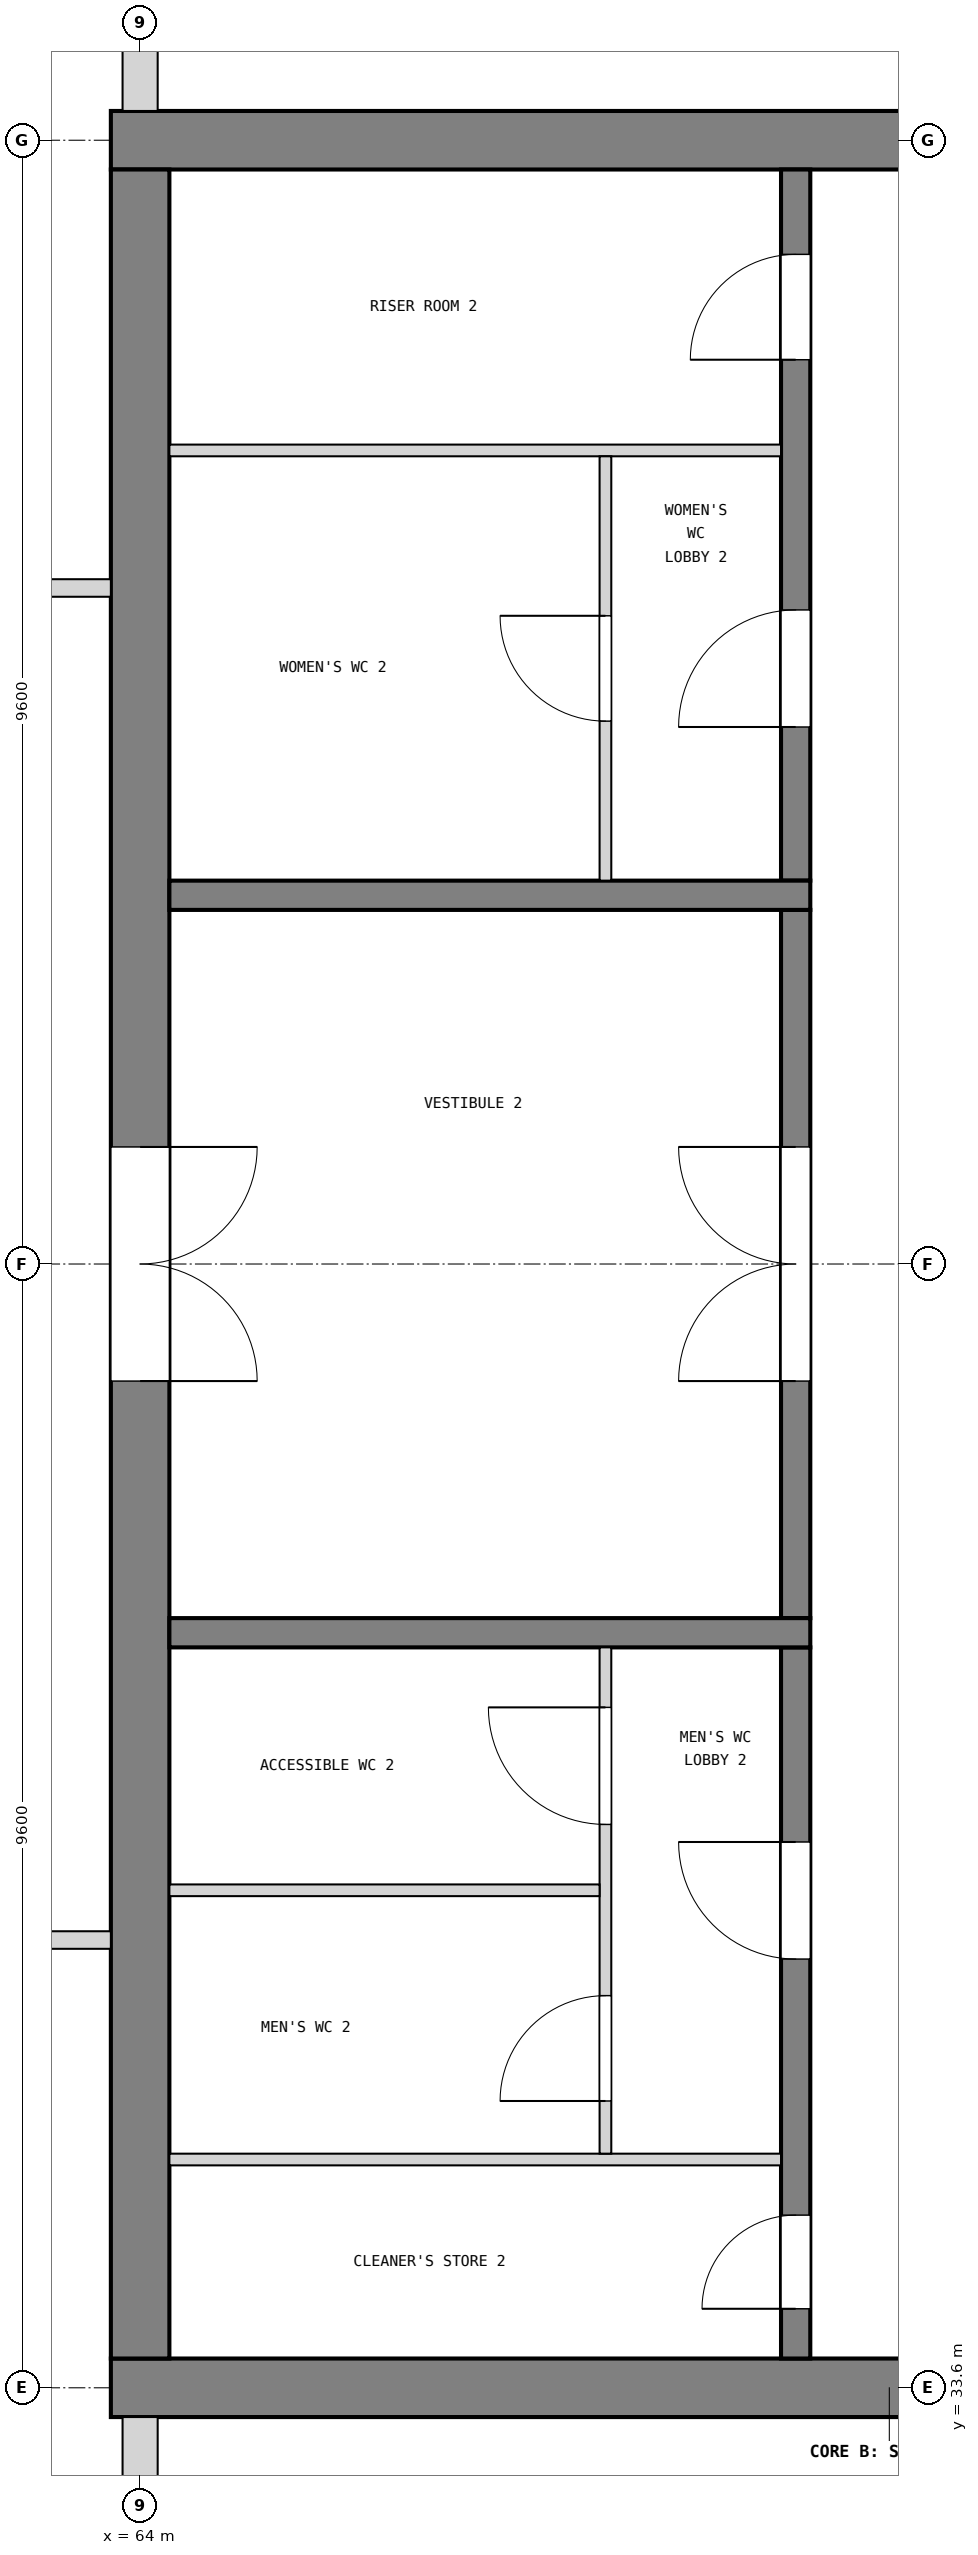
"""IFC4 building model, lengths in metres.
Left out: names, types, materials, properties, quantities, classifications, styles, units other than length and angle.
Written with IfcOpenShell. Run it as: python <this file> out.ifc"""

import sys

from ifc_helpers import new_model, si_unit, direction, frame, frame_2d, origin, place, context, subcontext, project, spatial, rectangle, extrude, element, fill, save


model = new_model("IFC4")
c1 = context("Model", 3, precision=1e-05, world=origin(), true_north=direction((0.0, 1.0)))
c2 = subcontext(c1, "Body", "Model", "MODEL_VIEW")
j1 = project(units=[si_unit("LENGTHUNIT", "METRE"), si_unit("PLANEANGLEUNIT", "RADIAN")], contexts=[c1])
p1 = place(None, origin())
s1 = spatial("IfcSite", under=j1, at=p1, CompositionType="ELEMENT")
p2 = place(p1, origin())
s2 = spatial("IfcBuilding", under=s1, at=p2, CompositionType="ELEMENT")
p3 = place(p2, frame((0.0, 0.0, 21.0)))
s3 = spatial("IfcBuildingStorey", under=s2, at=p3, CompositionType="ELEMENT", Elevation=21.0)
p4 = place(p3, frame((63.75, 52.8, 0.0), z_axis=(0.0, 0.0, 1.0), x_axis=(1.0, 0.0, 0.0)))
e1 = element("IfcWall", 1, at=p4, inside=s3, PredefinedType="SHEAR", context=c2, shape_type="SweptSolid", body=[
    extrude(rectangle(XDim=13.3, YDim=0.5, at=frame_2d((6.65, 0.0))), origin(), (0.0, 0.0, 1.0), 3.9),
])
p5 = place(p4, frame((11.05, 0.0, 1.0)))
e2 = element("IfcOpeningElement", 2, at=p5, cuts=e1, PredefinedType="OPENING", context=c2, shape_type="SweptSolid", body=[
    extrude(rectangle(XDim=0.4, YDim=2.0, at=frame_2d((0.2, 1.0))), frame((0.0, 0.26, 0.0), z_axis=(0.0, -1.0, 0.0), x_axis=(1.0, 0.0, 0.0)), (0.0, 0.0, 1.0), 0.52),
])
p6 = place(p3, frame((63.75, 33.6, 0.0), z_axis=(0.0, 0.0, 1.0), x_axis=(1.0, 0.0, 0.0)))
e3 = element("IfcWall", 3, at=p6, inside=s3, PredefinedType="SHEAR", context=c2, shape_type="SweptSolid", body=[
    extrude(rectangle(XDim=13.3, YDim=0.5, at=frame_2d((6.65, 0.0))), origin(), (0.0, 0.0, 1.0), 3.9),
])
p7 = place(p6, frame((11.05, 0.0, 1.0)))
e4 = element("IfcOpeningElement", 4, at=p7, cuts=e3, PredefinedType="OPENING", context=c2, shape_type="SweptSolid", body=[
    extrude(rectangle(XDim=0.4, YDim=2.0, at=frame_2d((0.2, 1.0))), frame((0.0, 0.26, 0.0), z_axis=(0.0, -1.0, 0.0), x_axis=(1.0, 0.0, 0.0)), (0.0, 0.0, 1.0), 0.52),
])
p8 = place(p3, frame((64.0, 33.85, 0.0), z_axis=(0.0, 0.0, 1.0), x_axis=(0.0, 1.0, 0.0)))
e5 = element("IfcWall", 5, at=p8, inside=s3, PredefinedType="SHEAR", context=c2, shape_type="SweptSolid", body=[
    extrude(rectangle(XDim=18.7, YDim=0.5, at=frame_2d((9.35, 0.0))), origin(), (0.0, 0.0, 1.0), 3.9),
])
p9 = place(p8, frame((8.35, 0.0, 0.0)))
e6 = element("IfcOpeningElement", 6, at=p9, cuts=e5, PredefinedType="OPENING", context=c2, shape_type="SweptSolid", body=[
    extrude(rectangle(XDim=2.0, YDim=2.1, at=frame_2d((1.0, 1.05))), frame((0.0, 0.26, 0.0), z_axis=(0.0, -1.0, 0.0), x_axis=(1.0, 0.0, 0.0)), (0.0, 0.0, 1.0), 0.52),
])
p10 = place(p3, frame((64.0, 31.0, 0.0), z_axis=(0.0, 0.0, 1.0), x_axis=(0.0, 1.0, 0.0)))
e7 = element("IfcWall", 7, at=p10, inside=s3, PredefinedType="SOLIDWALL", context=c2, shape_type="SweptSolid", body=[
    extrude(rectangle(XDim=2.35, YDim=0.3, at=frame_2d((1.175, 0.0))), origin(), (0.0, 0.0, 1.0), 2.88),
])
p11 = place(p3, frame((64.0, 53.05, 0.0), z_axis=(0.0, 0.0, 1.0), x_axis=(0.0, 1.0, 0.0)))
e8 = element("IfcWall", 8, at=p11, inside=s3, PredefinedType="SOLIDWALL", context=c2, shape_type="SweptSolid", body=[
    extrude(rectangle(XDim=2.35, YDim=0.3, at=frame_2d((1.175, 0.0))), origin(), (0.0, 0.0, 1.0), 2.88),
])
p12 = place(p3, frame((69.6, 33.85, 0.0), z_axis=(0.0, 0.0, 1.0), x_axis=(0.0, 1.0, 0.0)))
e9 = element("IfcWall", 9, at=p12, inside=s3, PredefinedType="SOLIDWALL", context=c2, shape_type="SweptSolid", body=[
    extrude(rectangle(XDim=6.075, YDim=0.25, at=frame_2d((3.038, 0.0))), origin(), (0.0, 0.0, 1.0), 3.6),
])
p13 = place(p12, frame((0.425, 0.0, 0.0)))
e10 = element("IfcOpeningElement", 10, at=p13, cuts=e9, PredefinedType="OPENING", context=c2, shape_type="SweptSolid", body=[
    extrude(rectangle(XDim=0.8, YDim=2.1, at=frame_2d((0.4, 1.05))), frame((0.0, 0.135, 0.0), z_axis=(0.0, -1.0, 0.0), x_axis=(1.0, 0.0, 0.0)), (0.0, 0.0, 1.0), 0.27),
])
p14 = place(p12, frame((3.413, 0.0, 0.0)))
e11 = element("IfcOpeningElement", 11, at=p14, cuts=e9, PredefinedType="OPENING", context=c2, shape_type="SweptSolid", body=[
    extrude(rectangle(XDim=1.0, YDim=2.1, at=frame_2d((0.5, 1.05))), frame((0.0, 0.135, 0.0), z_axis=(0.0, -1.0, 0.0), x_axis=(1.0, 0.0, 0.0)), (0.0, 0.0, 1.0), 0.27),
])
p15 = place(p3, frame((69.6, 40.175, 0.0), z_axis=(0.0, 0.0, 1.0), x_axis=(0.0, 1.0, 0.0)))
e12 = element("IfcWall", 12, at=p15, inside=s3, PredefinedType="SOLIDWALL", context=c2, shape_type="SweptSolid", body=[
    extrude(rectangle(XDim=6.05, YDim=0.25, at=frame_2d((3.025, 0.0))), origin(), (0.0, 0.0, 1.0), 3.6),
])
p16 = place(p15, frame((2.025, 0.0, 0.0)))
e13 = element("IfcOpeningElement", 13, at=p16, cuts=e12, PredefinedType="OPENING", context=c2, shape_type="SweptSolid", body=[
    extrude(rectangle(XDim=2.0, YDim=2.1, at=frame_2d((1.0, 1.05))), frame((0.0, 0.135, 0.0), z_axis=(0.0, -1.0, 0.0), x_axis=(1.0, 0.0, 0.0)), (0.0, 0.0, 1.0), 0.27),
])
p17 = place(p3, frame((69.6, 46.475, 0.0), z_axis=(0.0, 0.0, 1.0), x_axis=(0.0, 1.0, 0.0)))
e14 = element("IfcWall", 14, at=p17, inside=s3, PredefinedType="SOLIDWALL", context=c2, shape_type="SweptSolid", body=[
    extrude(rectangle(XDim=6.075, YDim=0.25, at=frame_2d((3.038, 0.0))), origin(), (0.0, 0.0, 1.0), 3.6),
])
p18 = place(p17, frame((1.312, 0.0, 0.0)))
e15 = element("IfcOpeningElement", 15, at=p18, cuts=e14, PredefinedType="OPENING", context=c2, shape_type="SweptSolid", body=[
    extrude(rectangle(XDim=1.0, YDim=2.1, at=frame_2d((0.5, 1.05))), frame((0.0, 0.135, 0.0), z_axis=(0.0, -1.0, 0.0), x_axis=(1.0, 0.0, 0.0)), (0.0, 0.0, 1.0), 0.27),
])
p19 = place(p17, frame((4.45, 0.0, 0.0)))
e16 = element("IfcOpeningElement", 16, at=p19, cuts=e14, PredefinedType="OPENING", context=c2, shape_type="SweptSolid", body=[
    extrude(rectangle(XDim=0.9, YDim=2.1, at=frame_2d((0.45, 1.05))), frame((0.0, 0.135, 0.0), z_axis=(0.0, -1.0, 0.0), x_axis=(1.0, 0.0, 0.0)), (0.0, 0.0, 1.0), 0.27),
])
for number, where, z_axis, x_axis in (
    (17, (69.725, 40.05, 0.0), (0.0, 0.0, 1.0), (-1.0, 0.0, 0.0)),
    (18, (69.725, 46.35, 0.0), (0.0, 0.0, 1.0), (-1.0, 0.0, 0.0)),
):
    element("IfcWall", number, at=place(p3, frame(where, z_axis=z_axis, x_axis=x_axis)), inside=s3, PredefinedType="SOLIDWALL", context=c2, shape_type="SweptSolid", body=[
        extrude(rectangle(XDim=5.475, YDim=0.25, at=frame_2d((2.738, 0.0))), origin(), (0.0, 0.0, 1.0), 3.6),
    ])
p20 = place(p3, frame((69.475, 35.55, 0.0), z_axis=(0.0, 0.0, 1.0), x_axis=(-1.0, 0.0, 0.0)))
e19 = element("IfcWall", 19, at=p20, inside=s3, PredefinedType="PARTITIONING", context=c2, shape_type="SweptSolid", body=[
    extrude(rectangle(XDim=5.225, YDim=0.1, at=frame_2d((2.613, 0.0))), origin(), (0.0, 0.0, 1.0), 3.6),
])
p21 = place(p3, frame((67.975, 35.6, 0.0), z_axis=(0.0, 0.0, 1.0), x_axis=(0.0, 1.0, 0.0)))
e20 = element("IfcWall", 20, at=p21, inside=s3, PredefinedType="PARTITIONING", context=c2, shape_type="SweptSolid", body=[
    extrude(rectangle(XDim=4.325, YDim=0.1, at=frame_2d((2.163, 0.0))), origin(), (0.0, 0.0, 1.0), 3.6),
])
p22 = place(p21, frame((0.45, 0.0, 0.0)))
e21 = element("IfcOpeningElement", 21, at=p22, cuts=e20, PredefinedType="OPENING", context=c2, shape_type="SweptSolid", body=[
    extrude(rectangle(XDim=0.9, YDim=2.1, at=frame_2d((0.45, 1.05))), frame((0.0, 0.06, 0.0), z_axis=(0.0, -1.0, 0.0), x_axis=(1.0, 0.0, 0.0)), (0.0, 0.0, 1.0), 0.12),
])
p23 = place(p21, frame((2.812, 0.0, 0.0)))
e22 = element("IfcOpeningElement", 22, at=p23, cuts=e20, PredefinedType="OPENING", context=c2, shape_type="SweptSolid", body=[
    extrude(rectangle(XDim=1.0, YDim=2.1, at=frame_2d((0.5, 1.05))), frame((0.0, 0.06, 0.0), z_axis=(0.0, -1.0, 0.0), x_axis=(1.0, 0.0, 0.0)), (0.0, 0.0, 1.0), 0.12),
])
p24 = place(p3, frame((67.925, 37.85, 0.0), z_axis=(0.0, 0.0, 1.0), x_axis=(-1.0, 0.0, 0.0)))
e23 = element("IfcWall", 23, at=p24, inside=s3, PredefinedType="PARTITIONING", context=c2, shape_type="SweptSolid", body=[
    extrude(rectangle(XDim=3.675, YDim=0.1, at=frame_2d((1.837, 0.0))), origin(), (0.0, 0.0, 1.0), 3.6),
])
p25 = place(p3, frame((69.475, 50.15, 0.0), z_axis=(0.0, 0.0, 1.0), x_axis=(-1.0, 0.0, 0.0)))
e24 = element("IfcWall", 24, at=p25, inside=s3, PredefinedType="PARTITIONING", context=c2, shape_type="SweptSolid", body=[
    extrude(rectangle(XDim=5.225, YDim=0.1, at=frame_2d((2.613, 0.0))), origin(), (0.0, 0.0, 1.0), 3.6),
])
p26 = place(p3, frame((67.975, 46.475, 0.0), z_axis=(0.0, 0.0, 1.0), x_axis=(0.0, 1.0, 0.0)))
e25 = element("IfcWall", 25, at=p26, inside=s3, PredefinedType="PARTITIONING", context=c2, shape_type="SweptSolid", body=[
    extrude(rectangle(XDim=3.625, YDim=0.1, at=frame_2d((1.812, 0.0))), origin(), (0.0, 0.0, 1.0), 3.6),
])
p27 = place(p26, frame((1.363, 0.0, 0.0)))
e26 = element("IfcOpeningElement", 26, at=p27, cuts=e25, PredefinedType="OPENING", context=c2, shape_type="SweptSolid", body=[
    extrude(rectangle(XDim=0.9, YDim=2.1, at=frame_2d((0.45, 1.05))), frame((0.0, 0.06, 0.0), z_axis=(0.0, -1.0, 0.0), x_axis=(1.0, 0.0, 0.0)), (0.0, 0.0, 1.0), 0.12),
])
p28 = place(p3, frame((54.4, 37.425, 0.0), z_axis=(0.0, 0.0, 1.0), x_axis=(1.0, 0.0, 0.0)))
e27 = element("IfcWall", 27, at=p28, inside=s3, PredefinedType="PARTITIONING", context=c2, shape_type="SweptSolid", body=[
    extrude(rectangle(XDim=9.35, YDim=0.15, at=frame_2d((4.675, 0.0))), origin(), (0.0, 0.0, 1.0), 3.68),
])
p29 = place(p28, frame((3.85, 0.0, 0.0)))
e28 = element("IfcOpeningElement", 28, at=p29, cuts=e27, PredefinedType="OPENING", context=c2, shape_type="SweptSolid", body=[
    extrude(rectangle(XDim=1.8, YDim=2.1, at=frame_2d((0.9, 1.05))), frame((0.0, 0.085, 0.0), z_axis=(0.0, -1.0, 0.0), x_axis=(1.0, 0.0, 0.0)), (0.0, 0.0, 1.0), 0.17),
])
p30 = place(p3, frame((57.78, 48.975, 0.0), z_axis=(0.0, 0.0, 1.0), x_axis=(1.0, 0.0, 0.0)))
e29 = element("IfcWall", 29, at=p30, inside=s3, PredefinedType="PARTITIONING", context=c2, shape_type="SweptSolid", body=[
    extrude(rectangle(XDim=5.97, YDim=0.15, at=frame_2d((2.985, 0.0))), origin(), (0.0, 0.0, 1.0), 3.68),
])
p31 = place(p30, frame((2.52, 0.0, 0.0)))
e30 = element("IfcOpeningElement", 30, at=p31, cuts=e29, PredefinedType="OPENING", context=c2, shape_type="SweptSolid", body=[
    extrude(rectangle(XDim=1.0, YDim=2.1, at=frame_2d((0.5, 1.05))), frame((0.0, 0.085, 0.0), z_axis=(0.0, -1.0, 0.0), x_axis=(1.0, 0.0, 0.0)), (0.0, 0.0, 1.0), 0.17),
])
p32 = place(p16, origin())
e31 = element("IfcDoor", 31, at=p32, inside=s3, OperationType="DOUBLE_DOOR_SINGLE_SWING", PredefinedType="DOOR", context=c2, shape_type="SweptSolid", body=[
    extrude(rectangle(XDim=2.0, YDim=2.1, at=frame_2d((1.0, 1.05))), frame((0.0, 0.025, 0.0), z_axis=(0.0, -1.0, 0.0), x_axis=(1.0, 0.0, 0.0)), (0.0, 0.0, 1.0), 0.05),
])
fill(e13, e31)
p33 = place(p9, frame((2.0, 0.0, 0.0), z_axis=(0.0, 0.0, 1.0), x_axis=(-1.0, 0.0, 0.0)))
e32 = element("IfcDoor", 32, at=p33, inside=s3, OperationType="DOUBLE_DOOR_SINGLE_SWING", PredefinedType="DOOR", context=c2, shape_type="SweptSolid", body=[
    extrude(rectangle(XDim=2.0, YDim=2.1, at=frame_2d((1.0, 1.05))), frame((0.0, 0.025, 0.0), z_axis=(0.0, -1.0, 0.0), x_axis=(1.0, 0.0, 0.0)), (0.0, 0.0, 1.0), 0.05),
])
fill(e6, e32)
p34 = place(p13, origin())
e33 = element("IfcDoor", 33, at=p34, inside=s3, OperationType="SINGLE_SWING_LEFT", PredefinedType="DOOR", context=c2, shape_type="SweptSolid", body=[
    extrude(rectangle(XDim=0.8, YDim=2.1, at=frame_2d((0.4, 1.05))), frame((0.0, 0.025, 0.0), z_axis=(0.0, -1.0, 0.0), x_axis=(1.0, 0.0, 0.0)), (0.0, 0.0, 1.0), 0.05),
])
fill(e10, e33)
p35 = place(p14, origin())
e34 = element("IfcDoor", 34, at=p35, inside=s3, OperationType="SINGLE_SWING_RIGHT", PredefinedType="DOOR", context=c2, shape_type="SweptSolid", body=[
    extrude(rectangle(XDim=1.0, YDim=2.1, at=frame_2d((0.5, 1.05))), frame((0.0, 0.025, 0.0), z_axis=(0.0, -1.0, 0.0), x_axis=(1.0, 0.0, 0.0)), (0.0, 0.0, 1.0), 0.05),
])
fill(e11, e34)
p36 = place(p22, origin())
e35 = element("IfcDoor", 35, at=p36, inside=s3, OperationType="SINGLE_SWING_LEFT", PredefinedType="DOOR", context=c2, shape_type="SweptSolid", body=[
    extrude(rectangle(XDim=0.9, YDim=2.1, at=frame_2d((0.45, 1.05))), frame((0.0, 0.025, 0.0), z_axis=(0.0, -1.0, 0.0), x_axis=(1.0, 0.0, 0.0)), (0.0, 0.0, 1.0), 0.05),
])
fill(e21, e35)
p37 = place(p23, origin())
e36 = element("IfcDoor", 36, at=p37, inside=s3, OperationType="SINGLE_SWING_RIGHT", PredefinedType="DOOR", context=c2, shape_type="SweptSolid", body=[
    extrude(rectangle(XDim=1.0, YDim=2.1, at=frame_2d((0.5, 1.05))), frame((0.0, 0.025, 0.0), z_axis=(0.0, -1.0, 0.0), x_axis=(1.0, 0.0, 0.0)), (0.0, 0.0, 1.0), 0.05),
])
fill(e22, e36)
p38 = place(p18, origin())
e37 = element("IfcDoor", 37, at=p38, inside=s3, OperationType="SINGLE_SWING_LEFT", PredefinedType="DOOR", context=c2, shape_type="SweptSolid", body=[
    extrude(rectangle(XDim=1.0, YDim=2.1, at=frame_2d((0.5, 1.05))), frame((0.0, 0.025, 0.0), z_axis=(0.0, -1.0, 0.0), x_axis=(1.0, 0.0, 0.0)), (0.0, 0.0, 1.0), 0.05),
])
fill(e15, e37)
p39 = place(p27, origin())
e38 = element("IfcDoor", 38, at=p39, inside=s3, OperationType="SINGLE_SWING_RIGHT", PredefinedType="DOOR", context=c2, shape_type="SweptSolid", body=[
    extrude(rectangle(XDim=0.9, YDim=2.1, at=frame_2d((0.45, 1.05))), frame((0.0, 0.025, 0.0), z_axis=(0.0, -1.0, 0.0), x_axis=(1.0, 0.0, 0.0)), (0.0, 0.0, 1.0), 0.05),
])
fill(e26, e38)
p40 = place(p19, origin())
e39 = element("IfcDoor", 39, at=p40, inside=s3, OperationType="SINGLE_SWING_LEFT", PredefinedType="DOOR", context=c2, shape_type="SweptSolid", body=[
    extrude(rectangle(XDim=0.9, YDim=2.1, at=frame_2d((0.45, 1.05))), frame((0.0, 0.025, 0.0), z_axis=(0.0, -1.0, 0.0), x_axis=(1.0, 0.0, 0.0)), (0.0, 0.0, 1.0), 0.05),
])
fill(e16, e39)
save(model, sys.argv[1])
